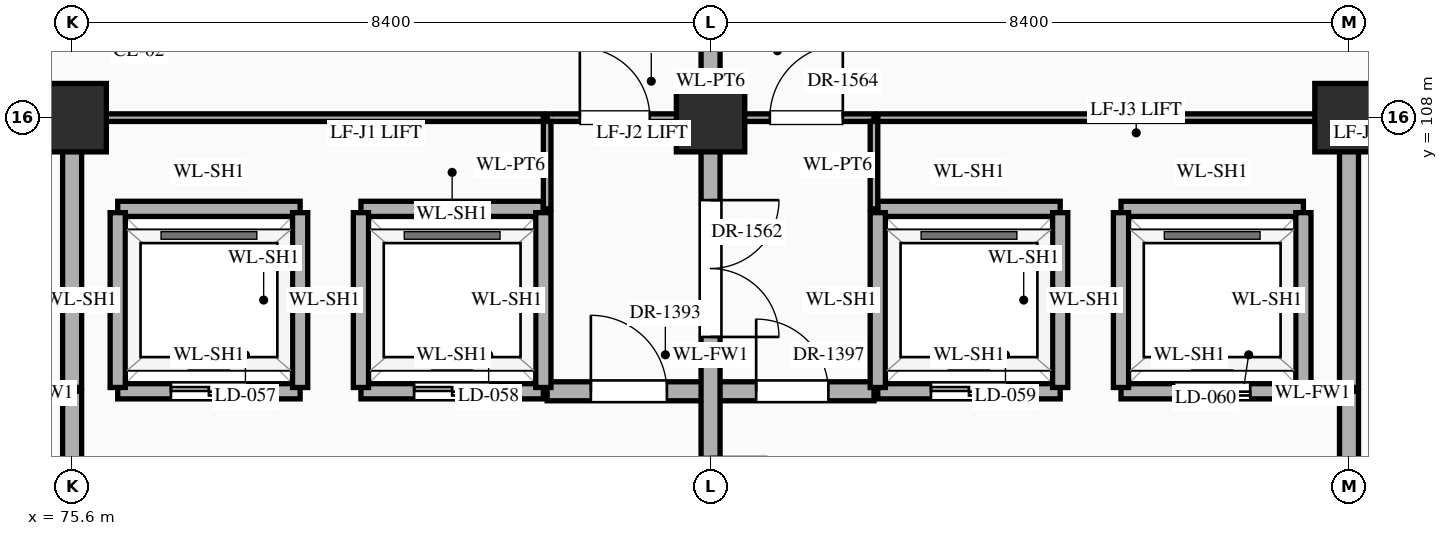
"""IFC4 building model, lengths in metres.
Left out: names, types, materials, properties, quantities, classifications, styles, units other than length and angle.
Written with IfcOpenShell. Run it as: python <this file> out.ifc"""

import sys

from ifc_helpers import new_model, si_unit, direction, frame, frame_2d, origin, origin_2d, place, context, subcontext, project, spatial, rectangle, extrude, element, fill, save


model = new_model("IFC4")
c1 = context("Model", 3, precision=1e-05, world=origin(), true_north=direction((0.0, 1.0)))
c2 = subcontext(c1, "Body", "Model", "MODEL_VIEW")
j1 = project(units=[si_unit("LENGTHUNIT", "METRE"), si_unit("PLANEANGLEUNIT", "RADIAN")], contexts=[c1])
p1 = place(None, origin())
s1 = spatial("IfcSite", under=j1, at=p1, CompositionType="ELEMENT")
p2 = place(p1, origin())
s2 = spatial("IfcBuilding", under=s1, at=p2, CompositionType="ELEMENT")
p3 = place(p2, frame((0.0, 0.0, 10.8)))
s3 = spatial("IfcBuildingStorey", under=s2, at=p3, CompositionType="ELEMENT", Elevation=10.8)
for number, where, z_axis, x_axis in (
    (1, (75.6, 108.0, 0.0), (0.0, 0.0, 1.0), (1.0, 0.0, 0.0)),
    (2, (84.0, 108.0, 0.0), (0.0, 0.0, 1.0), (1.0, 0.0, 0.0)),
    (3, (92.4, 108.0, 0.0), (0.0, 0.0, 1.0), (1.0, 0.0, 0.0)),
):
    element("IfcColumn", number, at=place(p3, frame(where, z_axis=z_axis, x_axis=x_axis)), inside=s3, PredefinedType="COLUMN", context=c2, shape_type="SweptSolid", body=[
        extrude(rectangle(XDim=0.9, YDim=0.9, at=origin_2d()), origin(), (0.0, 0.0, 1.0), 5.4),
    ])
p4 = place(p3, frame((76.2, 104.4, 0.0), z_axis=(0.0, 0.0, 1.0), x_axis=(1.0, 0.0, 0.0)))
e4 = element("IfcWall", 4, at=p4, inside=s3, PredefinedType="STANDARD", context=c2, shape_type="SweptSolid", body=[
    extrude(rectangle(XDim=2.4, YDim=0.2, at=frame_2d((1.2, 0.0))), origin(), (0.0, 0.0, 1.0), 5.12),
])
p5 = place(p4, frame((0.7, 0.0, 0.0)))
e5 = element("IfcOpeningElement", 5, at=p5, cuts=e4, PredefinedType="OPENING", context=c2, shape_type="SweptSolid", body=[
    extrude(rectangle(XDim=1.0, YDim=2.15, at=frame_2d((0.5, 1.075))), frame((0.0, 0.112, 0.0), z_axis=(0.0, -1.0, 0.0), x_axis=(1.0, 0.0, 0.0)), (0.0, 0.0, 1.0), 0.224),
])
p6 = place(p3, frame((79.4, 104.4, 0.0), z_axis=(0.0, 0.0, 1.0), x_axis=(1.0, 0.0, 0.0)))
e6 = element("IfcWall", 6, at=p6, inside=s3, PredefinedType="STANDARD", context=c2, shape_type="SweptSolid", body=[
    extrude(rectangle(XDim=2.4, YDim=0.2, at=frame_2d((1.2, 0.0))), origin(), (0.0, 0.0, 1.0), 5.12),
])
p7 = place(p6, frame((0.7, 0.0, 0.0)))
e7 = element("IfcOpeningElement", 7, at=p7, cuts=e6, PredefinedType="OPENING", context=c2, shape_type="SweptSolid", body=[
    extrude(rectangle(XDim=1.0, YDim=2.15, at=frame_2d((0.5, 1.075))), frame((0.0, 0.112, 0.0), z_axis=(0.0, -1.0, 0.0), x_axis=(1.0, 0.0, 0.0)), (0.0, 0.0, 1.0), 0.224),
])
p8 = place(p3, frame((81.85, 104.4, 0.0), z_axis=(0.0, 0.0, 1.0), x_axis=(1.0, 0.0, 0.0)))
e8 = element("IfcWall", 8, at=p8, inside=s3, PredefinedType="STANDARD", context=c2, shape_type="SweptSolid", body=[
    extrude(rectangle(XDim=4.3, YDim=0.25, at=frame_2d((2.15, 0.0))), origin(), (0.0, 0.0, 1.0), 5.12),
])
p9 = place(p8, frame((0.575, 0.0, 0.0)))
e9 = element("IfcOpeningElement", 9, at=p9, cuts=e8, PredefinedType="OPENING", context=c2, shape_type="SweptSolid", body=[
    extrude(rectangle(XDim=1.0, YDim=2.2, at=frame_2d((0.5, 1.1))), frame((0.0, 0.137, 0.0), z_axis=(0.0, -1.0, 0.0), x_axis=(1.0, 0.0, 0.0)), (0.0, 0.0, 1.0), 0.274),
])
p10 = place(p8, frame((2.75, 0.0, 0.0)))
e10 = element("IfcOpeningElement", 10, at=p10, cuts=e8, PredefinedType="OPENING", context=c2, shape_type="SweptSolid", body=[
    extrude(rectangle(XDim=0.95, YDim=2.15, at=frame_2d((0.475, 1.075))), frame((0.0, 0.137, 0.0), z_axis=(0.0, -1.0, 0.0), x_axis=(1.0, 0.0, 0.0)), (0.0, 0.0, 1.0), 0.274),
])
p11 = place(p3, frame((86.2, 104.4, 0.0), z_axis=(0.0, 0.0, 1.0), x_axis=(1.0, 0.0, 0.0)))
e11 = element("IfcWall", 11, at=p11, inside=s3, PredefinedType="STANDARD", context=c2, shape_type="SweptSolid", body=[
    extrude(rectangle(XDim=2.4, YDim=0.2, at=frame_2d((1.2, 0.0))), origin(), (0.0, 0.0, 1.0), 5.12),
])
p12 = place(p11, frame((0.7, 0.0, 0.0)))
e12 = element("IfcOpeningElement", 12, at=p12, cuts=e11, PredefinedType="OPENING", context=c2, shape_type="SweptSolid", body=[
    extrude(rectangle(XDim=1.0, YDim=2.15, at=frame_2d((0.5, 1.075))), frame((0.0, 0.112, 0.0), z_axis=(0.0, -1.0, 0.0), x_axis=(1.0, 0.0, 0.0)), (0.0, 0.0, 1.0), 0.224),
])
p13 = place(p3, frame((89.4, 104.4, 0.0), z_axis=(0.0, 0.0, 1.0), x_axis=(1.0, 0.0, 0.0)))
e13 = element("IfcWall", 13, at=p13, inside=s3, PredefinedType="STANDARD", context=c2, shape_type="SweptSolid", body=[
    extrude(rectangle(XDim=2.4, YDim=0.2, at=frame_2d((1.2, 0.0))), origin(), (0.0, 0.0, 1.0), 5.12),
])
p14 = place(p13, frame((0.7, 0.0, 0.0)))
e14 = element("IfcOpeningElement", 14, at=p14, cuts=e13, PredefinedType="OPENING", context=c2, shape_type="SweptSolid", body=[
    extrude(rectangle(XDim=1.0, YDim=2.15, at=frame_2d((0.5, 1.075))), frame((0.0, 0.112, 0.0), z_axis=(0.0, -1.0, 0.0), x_axis=(1.0, 0.0, 0.0)), (0.0, 0.0, 1.0), 0.224),
])
for number, where, z_axis, x_axis in (
    (15, (76.2, 106.8, 0.0), (0.0, 0.0, 1.0), (1.0, 0.0, 0.0)),
    (16, (79.4, 106.8, 0.0), (0.0, 0.0, 1.0), (1.0, 0.0, 0.0)),
    (17, (86.2, 106.8, 0.0), (0.0, 0.0, 1.0), (1.0, 0.0, 0.0)),
    (18, (89.4, 106.8, 0.0), (0.0, 0.0, 1.0), (1.0, 0.0, 0.0)),
):
    element("IfcWall", number, at=place(p3, frame(where, z_axis=z_axis, x_axis=x_axis)), inside=s3, PredefinedType="STANDARD", context=c2, shape_type="SweptSolid", body=[
        extrude(rectangle(XDim=2.4, YDim=0.2, at=frame_2d((1.2, 0.0))), origin(), (0.0, 0.0, 1.0), 5.12),
    ])
p15 = place(p3, frame((71.4, 108.0, 0.0), z_axis=(0.0, 0.0, 1.0), x_axis=(1.0, 0.0, 0.0)))
e19 = element("IfcWall", 19, at=p15, inside=s3, PredefinedType="STANDARD", context=c2, shape_type="SweptSolid", body=[
    extrude(rectangle(XDim=4.2, YDim=0.25, at=frame_2d((2.1, 0.0))), origin(), (0.0, 0.0, 1.0), 4.27),
])
p16 = place(p15, frame((1.415, 0.0, 0.0)))
e20 = element("IfcOpeningElement", 20, at=p16, cuts=e19, PredefinedType="OPENING", context=c2, shape_type="SweptSolid", body=[
    extrude(rectangle(XDim=1.0, YDim=2.2, at=frame_2d((0.5, 1.1))), frame((0.0, 0.137, 0.0), z_axis=(0.0, -1.0, 0.0), x_axis=(1.0, 0.0, 0.0)), (0.0, 0.0, 1.0), 0.274),
])
p17 = place(p3, frame((75.65, 108.0, 0.0), z_axis=(0.0, 0.0, 1.0), x_axis=(1.0, 0.0, 0.0)))
e21 = element("IfcWall", 21, at=p17, inside=s3, PredefinedType="STANDARD", context=c2, shape_type="SweptSolid", body=[
    extrude(rectangle(XDim=6.15, YDim=0.1, at=frame_2d((3.075, 0.0))), origin(), (0.0, 0.0, 1.0), 4.27),
])
p18 = place(p3, frame((81.85, 108.0, 0.0), z_axis=(0.0, 0.0, 1.0), x_axis=(1.0, 0.0, 0.0)))
e22 = element("IfcWall", 22, at=p18, inside=s3, PredefinedType="STANDARD", context=c2, shape_type="SweptSolid", body=[
    extrude(rectangle(XDim=4.3, YDim=0.1, at=frame_2d((2.15, 0.0))), origin(), (0.0, 0.0, 1.0), 4.27),
])
p19 = place(p18, frame((0.43, 0.0, 0.0)))
e23 = element("IfcOpeningElement", 23, at=p19, cuts=e22, PredefinedType="OPENING", context=c2, shape_type="SweptSolid", body=[
    extrude(rectangle(XDim=0.92, YDim=2.15, at=frame_2d((0.46, 1.075))), frame((0.0, 0.062, 0.0), z_axis=(0.0, -1.0, 0.0), x_axis=(1.0, 0.0, 0.0)), (0.0, 0.0, 1.0), 0.124),
])
p20 = place(p18, frame((2.93, 0.0, 0.0)))
e24 = element("IfcOpeningElement", 24, at=p20, cuts=e22, PredefinedType="OPENING", context=c2, shape_type="SweptSolid", body=[
    extrude(rectangle(XDim=0.96, YDim=2.2, at=frame_2d((0.48, 1.1))), frame((0.0, 0.062, 0.0), z_axis=(0.0, -1.0, 0.0), x_axis=(1.0, 0.0, 0.0)), (0.0, 0.0, 1.0), 0.124),
])
p21 = place(p3, frame((86.2, 108.0, 0.0), z_axis=(0.0, 0.0, 1.0), x_axis=(1.0, 0.0, 0.0)))
e25 = element("IfcWall", 25, at=p21, inside=s3, PredefinedType="STANDARD", context=c2, shape_type="SweptSolid", body=[
    extrude(rectangle(XDim=6.15, YDim=0.1, at=frame_2d((3.075, 0.0))), origin(), (0.0, 0.0, 1.0), 4.27),
])
p22 = place(p3, frame((92.4, 108.0, 0.0), z_axis=(0.0, 0.0, 1.0), x_axis=(1.0, 0.0, 0.0)))
e26 = element("IfcWall", 26, at=p22, inside=s3, PredefinedType="STANDARD", context=c2, shape_type="SweptSolid", body=[
    extrude(rectangle(XDim=4.2, YDim=0.25, at=frame_2d((2.1, 0.0))), origin(), (0.0, 0.0, 1.0), 4.27),
])
p23 = place(p22, frame((1.735, 0.0, 0.0)))
e27 = element("IfcOpeningElement", 27, at=p23, cuts=e26, PredefinedType="OPENING", context=c2, shape_type="SweptSolid", body=[
    extrude(rectangle(XDim=1.1, YDim=2.2, at=frame_2d((0.55, 1.1))), frame((0.0, 0.137, 0.0), z_axis=(0.0, -1.0, 0.0), x_axis=(1.0, 0.0, 0.0)), (0.0, 0.0, 1.0), 0.274),
])
p24 = place(p3, frame((75.6, 100.8, 0.0), z_axis=(0.0, 0.0, 1.0), x_axis=(0.0, 1.0, 0.0)))
e28 = element("IfcWall", 28, at=p24, inside=s3, PredefinedType="STANDARD", context=c2, shape_type="SweptSolid", body=[
    extrude(rectangle(XDim=3.6, YDim=0.25, at=frame_2d((1.8, 0.0))), origin(), (0.0, 0.0, 1.0), 4.37),
])
p25 = place(p24, frame((0.91, 0.0, 0.0)))
e29 = element("IfcOpeningElement", 29, at=p25, cuts=e28, PredefinedType="OPENING", context=c2, shape_type="SweptSolid", body=[
    extrude(rectangle(XDim=0.95, YDim=2.15, at=frame_2d((0.475, 1.075))), frame((0.0, 0.137, 0.0), z_axis=(0.0, -1.0, 0.0), x_axis=(1.0, 0.0, 0.0)), (0.0, 0.0, 1.0), 0.274),
])
p26 = place(p3, frame((75.6, 104.45, 0.0), z_axis=(0.0, 0.0, 1.0), x_axis=(0.0, 1.0, 0.0)))
e30 = element("IfcWall", 30, at=p26, inside=s3, PredefinedType="STANDARD", context=c2, shape_type="SweptSolid", body=[
    extrude(rectangle(XDim=3.5, YDim=0.25, at=frame_2d((1.75, 0.0))), origin(), (0.0, 0.0, 1.0), 4.37),
])
for number, where, z_axis, x_axis in (
    (31, (76.2, 104.45, 0.0), (0.0, 0.0, 1.0), (0.0, 1.0, 0.0)),
    (32, (78.6, 104.45, 0.0), (0.0, 0.0, 1.0), (0.0, 1.0, 0.0)),
    (33, (79.4, 104.45, 0.0), (0.0, 0.0, 1.0), (0.0, 1.0, 0.0)),
    (34, (81.8, 104.45, 0.0), (0.0, 0.0, 1.0), (0.0, 1.0, 0.0)),
):
    element("IfcWall", number, at=place(p3, frame(where, z_axis=z_axis, x_axis=x_axis)), inside=s3, PredefinedType="STANDARD", context=c2, shape_type="SweptSolid", body=[
        extrude(rectangle(XDim=2.3, YDim=0.2, at=frame_2d((1.15, 0.0))), origin(), (0.0, 0.0, 1.0), 5.12),
    ])
p27 = place(p3, frame((81.85, 106.8, 0.0), z_axis=(0.0, 0.0, 1.0), x_axis=(0.0, 1.0, 0.0)))
e35 = element("IfcWall", 35, at=p27, inside=s3, PredefinedType="STANDARD", context=c2, shape_type="SweptSolid", body=[
    extrude(rectangle(XDim=1.15, YDim=0.1, at=frame_2d((0.575, 0.0))), origin(), (0.0, 0.0, 1.0), 5.12),
])
p28 = place(p3, frame((84.0, 79.2, 0.0), z_axis=(0.0, 0.0, 1.0), x_axis=(0.0, 1.0, 0.0)))
e36 = element("IfcWall", 36, at=p28, inside=s3, PredefinedType="STANDARD", context=c2, shape_type="SweptSolid", body=[
    extrude(rectangle(XDim=35.96, YDim=0.25, at=frame_2d((17.98, 0.0))), origin(), (0.0, 0.0, 1.0), 4.37),
])
p29 = place(p28, frame((22.835, 0.0, 0.0)))
e37 = element("IfcOpeningElement", 37, at=p29, cuts=e36, PredefinedType="OPENING", context=c2, shape_type="SweptSolid", body=[
    extrude(rectangle(XDim=1.5, YDim=2.25, at=frame_2d((0.75, 1.125))), frame((0.0, 0.137, 0.0), z_axis=(0.0, -1.0, 0.0), x_axis=(1.0, 0.0, 0.0)), (0.0, 0.0, 1.0), 0.274),
])
p30 = place(p28, frame((12.465, 0.0, 0.0)))
e38 = element("IfcOpeningElement", 38, at=p30, cuts=e36, PredefinedType="OPENING", context=c2, shape_type="SweptSolid", body=[
    extrude(rectangle(XDim=1.1, YDim=2.2, at=frame_2d((0.55, 1.1))), frame((0.0, 0.137, 0.0), z_axis=(0.0, -1.0, 0.0), x_axis=(1.0, 0.0, 0.0)), (0.0, 0.0, 1.0), 0.274),
])
p31 = place(p28, frame((15.31, 0.0, 0.0)))
e39 = element("IfcOpeningElement", 39, at=p31, cuts=e36, PredefinedType="OPENING", context=c2, shape_type="SweptSolid", body=[
    extrude(rectangle(XDim=0.95, YDim=2.15, at=frame_2d((0.475, 1.075))), frame((0.0, 0.137, 0.0), z_axis=(0.0, -1.0, 0.0), x_axis=(1.0, 0.0, 0.0)), (0.0, 0.0, 1.0), 0.274),
])
p32 = place(p28, frame((25.915, 0.0, 0.0)))
e40 = element("IfcOpeningElement", 40, at=p32, cuts=e36, PredefinedType="OPENING", context=c2, shape_type="SweptSolid", body=[
    extrude(rectangle(XDim=1.8, YDim=2.35, at=frame_2d((0.9, 1.175))), frame((0.0, 0.137, 0.0), z_axis=(0.0, -1.0, 0.0), x_axis=(1.0, 0.0, 0.0)), (0.0, 0.0, 1.0), 0.274),
])
p33 = place(p28, frame((29.71, 0.0, 0.0)))
e41 = element("IfcOpeningElement", 41, at=p33, cuts=e36, PredefinedType="OPENING", context=c2, shape_type="SweptSolid", body=[
    extrude(rectangle(XDim=0.95, YDim=2.15, at=frame_2d((0.475, 1.075))), frame((0.0, 0.137, 0.0), z_axis=(0.0, -1.0, 0.0), x_axis=(1.0, 0.0, 0.0)), (0.0, 0.0, 1.0), 0.274),
])
p34 = place(p28, frame((5.265, 0.0, 0.0)))
e42 = element("IfcOpeningElement", 42, at=p34, cuts=e36, PredefinedType="OPENING", context=c2, shape_type="SweptSolid", body=[
    extrude(rectangle(XDim=1.1, YDim=2.2, at=frame_2d((0.55, 1.1))), frame((0.0, 0.137, 0.0), z_axis=(0.0, -1.0, 0.0), x_axis=(1.0, 0.0, 0.0)), (0.0, 0.0, 1.0), 0.274),
])
p35 = place(p3, frame((86.15, 106.8, 0.0), z_axis=(0.0, 0.0, 1.0), x_axis=(0.0, 1.0, 0.0)))
e43 = element("IfcWall", 43, at=p35, inside=s3, PredefinedType="STANDARD", context=c2, shape_type="SweptSolid", body=[
    extrude(rectangle(XDim=1.15, YDim=0.1, at=frame_2d((0.575, 0.0))), origin(), (0.0, 0.0, 1.0), 5.12),
])
for number, where, z_axis, x_axis in (
    (44, (86.2, 104.45, 0.0), (0.0, 0.0, 1.0), (0.0, 1.0, 0.0)),
    (45, (88.6, 104.45, 0.0), (0.0, 0.0, 1.0), (0.0, 1.0, 0.0)),
    (46, (89.4, 104.45, 0.0), (0.0, 0.0, 1.0), (0.0, 1.0, 0.0)),
    (47, (91.8, 104.45, 0.0), (0.0, 0.0, 1.0), (0.0, 1.0, 0.0)),
):
    element("IfcWall", number, at=place(p3, frame(where, z_axis=z_axis, x_axis=x_axis)), inside=s3, PredefinedType="STANDARD", context=c2, shape_type="SweptSolid", body=[
        extrude(rectangle(XDim=2.3, YDim=0.2, at=frame_2d((1.15, 0.0))), origin(), (0.0, 0.0, 1.0), 5.12),
    ])
p36 = place(p3, frame((92.4, 100.8, 0.0), z_axis=(0.0, 0.0, 1.0), x_axis=(0.0, 1.0, 0.0)))
e48 = element("IfcWall", 48, at=p36, inside=s3, PredefinedType="STANDARD", context=c2, shape_type="SweptSolid", body=[
    extrude(rectangle(XDim=3.6, YDim=0.25, at=frame_2d((1.8, 0.0))), origin(), (0.0, 0.0, 1.0), 4.37),
])
p37 = place(p36, frame((0.885, 0.0, 0.0)))
e49 = element("IfcOpeningElement", 49, at=p37, cuts=e48, PredefinedType="OPENING", context=c2, shape_type="SweptSolid", body=[
    extrude(rectangle(XDim=1.0, YDim=2.2, at=frame_2d((0.5, 1.1))), frame((0.0, 0.137, 0.0), z_axis=(0.0, -1.0, 0.0), x_axis=(1.0, 0.0, 0.0)), (0.0, 0.0, 1.0), 0.274),
])
p38 = place(p3, frame((92.4, 104.45, 0.0), z_axis=(0.0, 0.0, 1.0), x_axis=(0.0, 1.0, 0.0)))
e50 = element("IfcWall", 50, at=p38, inside=s3, PredefinedType="STANDARD", context=c2, shape_type="SweptSolid", body=[
    extrude(rectangle(XDim=3.5, YDim=0.25, at=frame_2d((1.75, 0.0))), origin(), (0.0, 0.0, 1.0), 4.37),
])
p39 = place(p5, origin())
e51 = element("IfcDoor", 51, at=p39, inside=s3, OperationType="DOUBLE_DOOR_SLIDING", PredefinedType="DOOR", context=c2, shape_type="SweptSolid", body=[
    extrude(rectangle(XDim=1.0, YDim=2.15, at=frame_2d((0.5, 1.075))), frame((0.0, 0.025, 0.0), z_axis=(0.0, -1.0, 0.0), x_axis=(1.0, 0.0, 0.0)), (0.0, 0.0, 1.0), 0.05),
])
fill(e5, e51)
p40 = place(p7, origin())
e52 = element("IfcDoor", 52, at=p40, inside=s3, OperationType="DOUBLE_DOOR_SLIDING", PredefinedType="DOOR", context=c2, shape_type="SweptSolid", body=[
    extrude(rectangle(XDim=1.0, YDim=2.15, at=frame_2d((0.5, 1.075))), frame((0.0, 0.025, 0.0), z_axis=(0.0, -1.0, 0.0), x_axis=(1.0, 0.0, 0.0)), (0.0, 0.0, 1.0), 0.05),
])
fill(e7, e52)
p41 = place(p12, origin())
e53 = element("IfcDoor", 53, at=p41, inside=s3, OperationType="DOUBLE_DOOR_SLIDING", PredefinedType="DOOR", context=c2, shape_type="SweptSolid", body=[
    extrude(rectangle(XDim=1.0, YDim=2.15, at=frame_2d((0.5, 1.075))), frame((0.0, 0.025, 0.0), z_axis=(0.0, -1.0, 0.0), x_axis=(1.0, 0.0, 0.0)), (0.0, 0.0, 1.0), 0.05),
])
fill(e12, e53)
p42 = place(p14, origin())
e54 = element("IfcDoor", 54, at=p42, inside=s3, OperationType="DOUBLE_DOOR_SLIDING", PredefinedType="DOOR", context=c2, shape_type="SweptSolid", body=[
    extrude(rectangle(XDim=1.0, YDim=2.15, at=frame_2d((0.5, 1.075))), frame((0.0, 0.025, 0.0), z_axis=(0.0, -1.0, 0.0), x_axis=(1.0, 0.0, 0.0)), (0.0, 0.0, 1.0), 0.05),
])
fill(e14, e54)
p43 = place(p9, origin())
e55 = element("IfcDoor", 55, at=p43, inside=s3, OperationType="SINGLE_SWING_LEFT", PredefinedType="DOOR", context=c2, shape_type="SweptSolid", body=[
    extrude(rectangle(XDim=1.0, YDim=2.2, at=frame_2d((0.5, 1.1))), frame((0.0, 0.025, 0.0), z_axis=(0.0, -1.0, 0.0), x_axis=(1.0, 0.0, 0.0)), (0.0, 0.0, 1.0), 0.05),
])
fill(e9, e55)
p44 = place(p10, origin())
e56 = element("IfcDoor", 56, at=p44, inside=s3, OperationType="SINGLE_SWING_LEFT", PredefinedType="DOOR", context=c2, shape_type="SweptSolid", body=[
    extrude(rectangle(XDim=0.95, YDim=2.15, at=frame_2d((0.475, 1.075))), frame((0.0, 0.025, 0.0), z_axis=(0.0, -1.0, 0.0), x_axis=(1.0, 0.0, 0.0)), (0.0, 0.0, 1.0), 0.05),
])
fill(e10, e56)
p45 = place(p32, frame((1.8, 0.0, 0.0), z_axis=(0.0, 0.0, 1.0), x_axis=(-1.0, 0.0, 0.0)))
e57 = element("IfcDoor", 57, at=p45, inside=s3, OperationType="DOUBLE_DOOR_SINGLE_SWING", PredefinedType="DOOR", context=c2, shape_type="SweptSolid", body=[
    extrude(rectangle(XDim=1.8, YDim=2.35, at=frame_2d((0.9, 1.175))), frame((0.0, 0.025, 0.0), z_axis=(0.0, -1.0, 0.0), x_axis=(1.0, 0.0, 0.0)), (0.0, 0.0, 1.0), 0.05),
])
fill(e40, e57)
p46 = place(p19, origin())
e58 = element("IfcDoor", 58, at=p46, inside=s3, OperationType="SINGLE_SWING_LEFT", PredefinedType="DOOR", context=c2, shape_type="SweptSolid", body=[
    extrude(rectangle(XDim=0.92, YDim=2.15, at=frame_2d((0.46, 1.075))), frame((0.0, 0.025, 0.0), z_axis=(0.0, -1.0, 0.0), x_axis=(1.0, 0.0, 0.0)), (0.0, 0.0, 1.0), 0.05),
])
fill(e23, e58)
p47 = place(p20, origin())
e59 = element("IfcDoor", 59, at=p47, inside=s3, OperationType="SINGLE_SWING_RIGHT", PredefinedType="DOOR", context=c2, shape_type="SweptSolid", body=[
    extrude(rectangle(XDim=0.96, YDim=2.2, at=frame_2d((0.48, 1.1))), frame((0.0, 0.025, 0.0), z_axis=(0.0, -1.0, 0.0), x_axis=(1.0, 0.0, 0.0)), (0.0, 0.0, 1.0), 0.05),
])
fill(e24, e59)
save(model, sys.argv[1])
